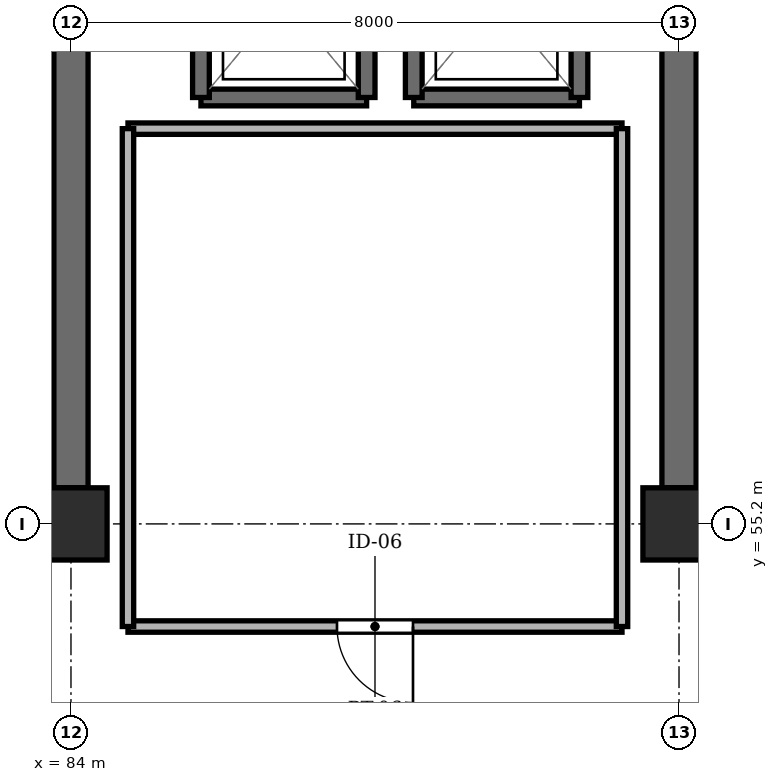
"""IFC4 building model, lengths in metres.
Left out: names, types, materials, properties, quantities, classifications, styles, units other than length and angle.
Written with IfcOpenShell. Run it as: python <this file> out.ifc"""

import sys

from ifc_helpers import new_model, si_unit, direction, frame, frame_2d, origin, origin_2d, place, context, subcontext, project, spatial, rectangle, extrude, element, fill, save


model = new_model("IFC4")
c1 = context("Model", 3, precision=1e-05, world=origin(), true_north=direction((0.0, 1.0)))
c2 = subcontext(c1, "Body", "Model", "MODEL_VIEW")
j1 = project(units=[si_unit("LENGTHUNIT", "METRE"), si_unit("PLANEANGLEUNIT", "RADIAN")], contexts=[c1])
p1 = place(None, origin())
s1 = spatial("IfcSite", under=j1, at=p1, CompositionType="ELEMENT")
p2 = place(p1, origin())
s2 = spatial("IfcBuilding", under=s1, at=p2, CompositionType="ELEMENT")
p3 = place(p2, frame((0.0, 0.0, 37.3)))
s3 = spatial("IfcBuildingStorey", under=s2, at=p3, CompositionType="ELEMENT", Elevation=37.3)
for number, where, z_axis, x_axis in (
    (1, (84.0, 55.2, -0.25), (0.0, 0.0, 1.0), (1.0, 0.0, 0.0)),
    (2, (92.0, 55.2, -0.25), (0.0, 0.0, 1.0), (1.0, 0.0, 0.0)),
):
    element("IfcColumn", number, at=place(p3, frame(where, z_axis=z_axis, x_axis=x_axis)), inside=s3, PredefinedType="COLUMN", context=c2, shape_type="SweptSolid", body=[
        extrude(rectangle(XDim=0.95, YDim=0.95, at=origin_2d()), origin(), (0.0, 0.0, 1.0), 3.26),
    ])
for number, where, z_axis, x_axis in (
    (3, (84.0, 55.675, 0.0), (0.0, 0.0, 1.0), (0.0, 1.0, 0.0)),
    (4, (92.0, 55.675, 0.0), (0.0, 0.0, 1.0), (0.0, 1.0, 0.0)),
):
    element("IfcWall", number, at=place(p3, frame(where, z_axis=z_axis, x_axis=x_axis)), inside=s3, PredefinedType="SHEAR", context=c2, shape_type="SweptSolid", body=[
        extrude(rectangle(XDim=6.325, YDim=0.45, at=frame_2d((3.163, 0.0))), origin(), (0.0, 0.0, 1.0), 3.01),
    ])
p4 = place(p3, frame((85.71, 60.81, 0.0), z_axis=(0.0, 0.0, 1.0), x_axis=(1.0, 0.0, 0.0)))
e5 = element("IfcWall", 5, at=p4, inside=s3, PredefinedType="SHEAR", context=c2, shape_type="SweptSolid", body=[
    extrude(rectangle(XDim=2.18, YDim=0.22, at=frame_2d((1.09, 0.0))), origin(), (0.0, 0.0, 1.0), 3.01),
])
for number, where, z_axis, x_axis in (
    (6, (85.71, 63.39, 0.0), (0.0, 0.0, 1.0), (0.0, -1.0, 0.0)),
    (7, (87.89, 60.81, 0.0), (0.0, 0.0, 1.0), (0.0, 1.0, 0.0)),
):
    element("IfcWall", number, at=place(p3, frame(where, z_axis=z_axis, x_axis=x_axis)), inside=s3, PredefinedType="SHEAR", context=c2, shape_type="SweptSolid", body=[
        extrude(rectangle(XDim=2.58, YDim=0.22, at=frame_2d((1.29, 0.0))), origin(), (0.0, 0.0, 1.0), 3.01),
    ])
p5 = place(p3, frame((88.51, 60.81, 0.0), z_axis=(0.0, 0.0, 1.0), x_axis=(1.0, 0.0, 0.0)))
e8 = element("IfcWall", 8, at=p5, inside=s3, PredefinedType="SHEAR", context=c2, shape_type="SweptSolid", body=[
    extrude(rectangle(XDim=2.18, YDim=0.22, at=frame_2d((1.09, 0.0))), origin(), (0.0, 0.0, 1.0), 3.01),
])
for number, where, z_axis, x_axis in (
    (9, (88.51, 63.39, 0.0), (0.0, 0.0, 1.0), (0.0, -1.0, 0.0)),
    (10, (90.69, 60.81, 0.0), (0.0, 0.0, 1.0), (0.0, 1.0, 0.0)),
):
    element("IfcWall", number, at=place(p3, frame(where, z_axis=z_axis, x_axis=x_axis)), inside=s3, PredefinedType="SHEAR", context=c2, shape_type="SweptSolid", body=[
        extrude(rectangle(XDim=2.58, YDim=0.22, at=frame_2d((1.29, 0.0))), origin(), (0.0, 0.0, 1.0), 3.01),
    ])
p6 = place(p3, frame((84.75, 53.85, 0.0), z_axis=(0.0, 0.0, 1.0), x_axis=(1.0, 0.0, 0.0)))
e11 = element("IfcWall", 11, at=p6, inside=s3, PredefinedType="PARTITIONING", context=c2, shape_type="SweptSolid", body=[
    extrude(rectangle(XDim=6.5, YDim=0.15, at=frame_2d((3.25, 0.0))), origin(), (0.0, 0.0, 1.0), 2.53),
])
p7 = place(p6, frame((2.75, 0.0, 0.0)))
e12 = element("IfcOpeningElement", 12, at=p7, cuts=e11, PredefinedType="OPENING", context=c2, shape_type="SweptSolid", body=[
    extrude(rectangle(XDim=1.0, YDim=2.15, at=frame_2d((0.5, 1.075))), frame((0.0, 0.087, 0.0), z_axis=(0.0, -1.0, 0.0), x_axis=(1.0, 0.0, 0.0)), (0.0, 0.0, 1.0), 0.174),
])
p8 = place(p3, frame((84.75, 60.4, 0.0), z_axis=(0.0, 0.0, 1.0), x_axis=(1.0, 0.0, 0.0)))
e13 = element("IfcWall", 13, at=p8, inside=s3, PredefinedType="PARTITIONING", context=c2, shape_type="SweptSolid", body=[
    extrude(rectangle(XDim=6.5, YDim=0.15, at=frame_2d((3.25, 0.0))), origin(), (0.0, 0.0, 1.0), 2.53),
])
for number, where, z_axis, x_axis in (
    (14, (84.75, 53.85, 0.0), (0.0, 0.0, 1.0), (0.0, 1.0, 0.0)),
    (15, (91.25, 53.85, 0.0), (0.0, 0.0, 1.0), (0.0, 1.0, 0.0)),
):
    element("IfcWall", number, at=place(p3, frame(where, z_axis=z_axis, x_axis=x_axis)), inside=s3, PredefinedType="PARTITIONING", context=c2, shape_type="SweptSolid", body=[
        extrude(rectangle(XDim=6.55, YDim=0.15, at=frame_2d((3.275, 0.0))), origin(), (0.0, 0.0, 1.0), 2.53),
    ])
p9 = place(p7, frame((1.0, 0.0, 0.0), z_axis=(0.0, 0.0, 1.0), x_axis=(-1.0, 0.0, 0.0)))
e16 = element("IfcDoor", 16, at=p9, inside=s3, OperationType="SINGLE_SWING_RIGHT", PredefinedType="DOOR", context=c2, shape_type="SweptSolid", body=[
    extrude(rectangle(XDim=1.0, YDim=2.15, at=frame_2d((0.5, 1.075))), frame((0.0, 0.025, 0.0), z_axis=(0.0, -1.0, 0.0), x_axis=(1.0, 0.0, 0.0)), (0.0, 0.0, 1.0), 0.05),
])
fill(e12, e16)
save(model, sys.argv[1])
